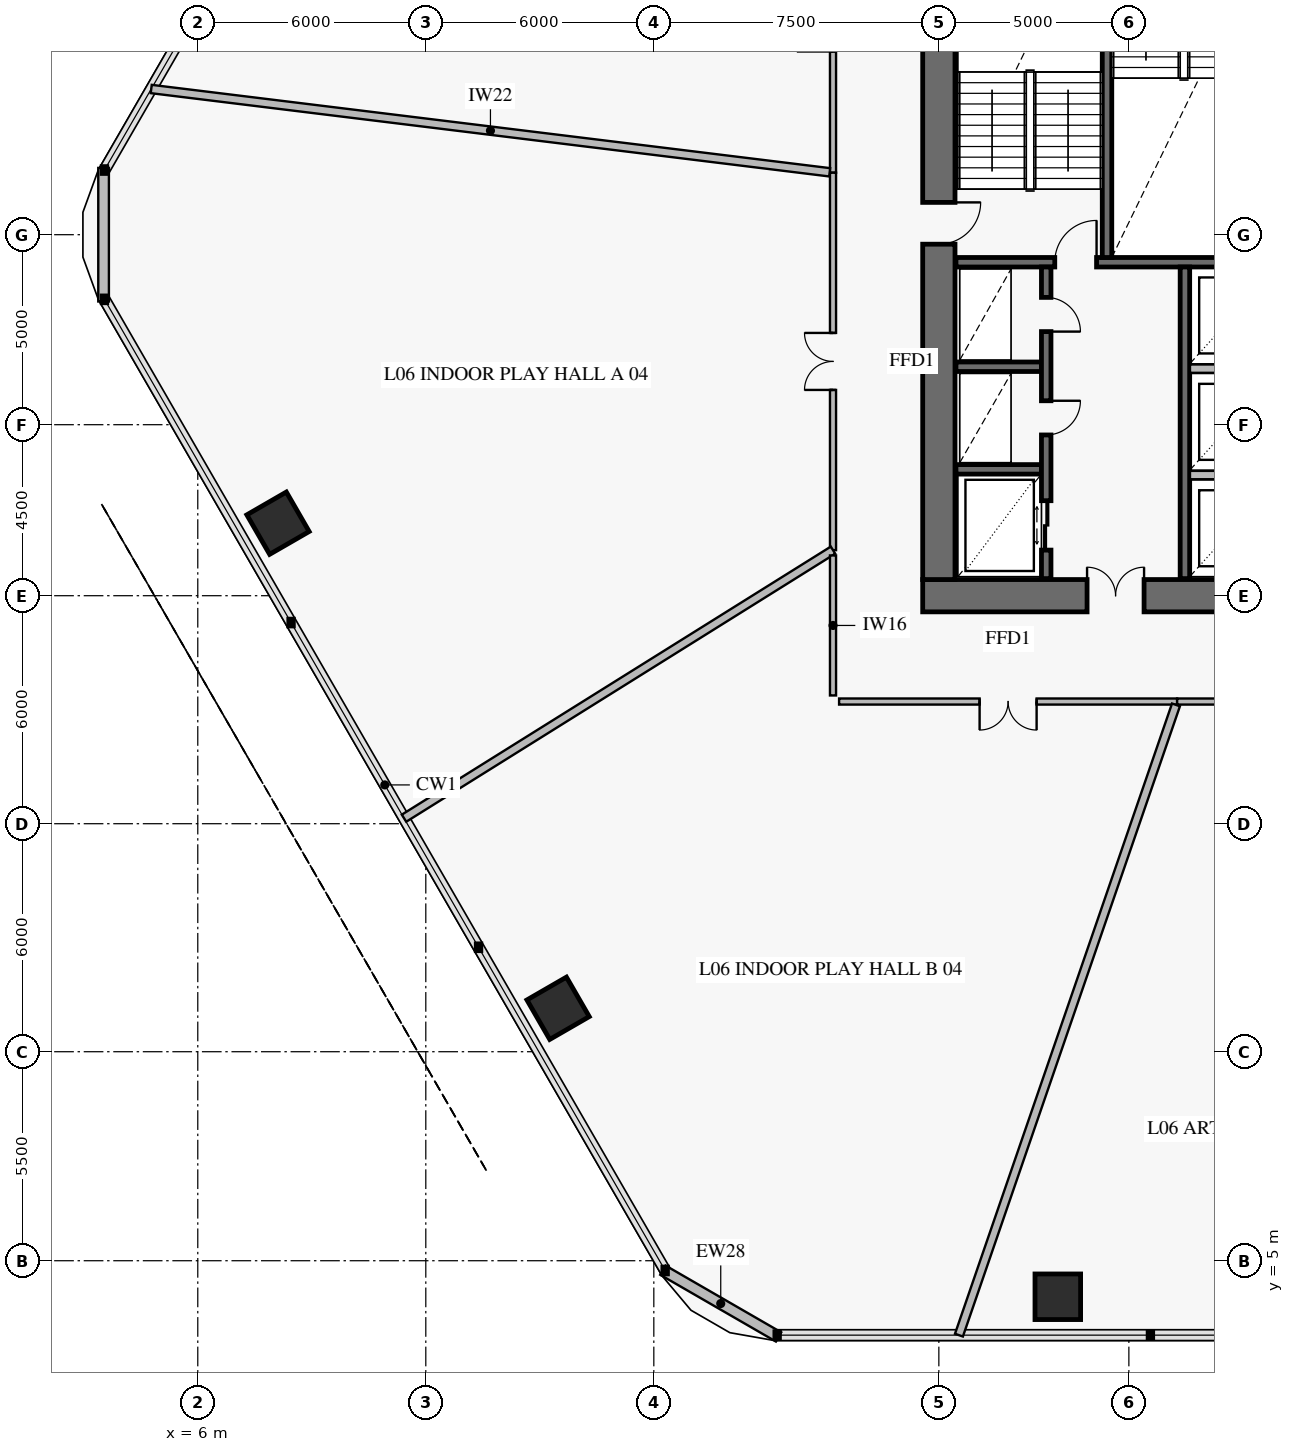
"""IFC4 building model, lengths in metres.
Left out: names, types, materials, properties, quantities, classifications, styles, units other than length and angle.
Written with IfcOpenShell. Run it as: python <this file> out.ifc"""

import sys

from ifc_helpers import new_model, si_unit, direction, frame, frame_2d, origin, origin_2d, place, context, subcontext, project, spatial, rectangle, extrude, element, fill, save


model = new_model("IFC4")
c1 = context("Model", 3, precision=1e-05, world=origin(), true_north=direction((0.0, 1.0)))
c2 = subcontext(c1, "Body", "Model", "MODEL_VIEW")
j1 = project(units=[si_unit("LENGTHUNIT", "METRE"), si_unit("PLANEANGLEUNIT", "RADIAN")], contexts=[c1])
p1 = place(None, origin())
s1 = spatial("IfcSite", under=j1, at=p1, CompositionType="ELEMENT")
p2 = place(p1, origin())
s2 = spatial("IfcBuilding", under=s1, at=p2, CompositionType="ELEMENT")
p3 = place(p2, frame((0.0, 0.0, 24.6)))
s3 = spatial("IfcBuildingStorey", under=s2, at=p3, CompositionType="ELEMENT", Elevation=24.6)
p4 = place(p3, frame((25.075, 22.5, 0.0), z_axis=(0.0, 0.0, 1.0), x_axis=(1.0, 0.0, 0.0)))
e1 = element("IfcWall", 1, at=p4, inside=s3, PredefinedType="SHEAR", context=c2, shape_type="SweptSolid", body=[
    extrude(rectangle(XDim=9.975, YDim=0.85, at=frame_2d((4.988, 0.0))), origin(), (0.0, 0.0, 1.0), 4.2),
])
p5 = place(p4, frame((4.325, 0.0, 0.0)))
e2 = element("IfcOpeningElement", 2, at=p5, cuts=e1, PredefinedType="OPENING", context=c2, shape_type="SweptSolid", body=[
    extrude(rectangle(XDim=1.5, YDim=2.15, at=frame_2d((0.75, 1.075))), frame((0.0, 0.437, 0.0), z_axis=(0.0, -1.0, 0.0), x_axis=(1.0, 0.0, 0.0)), (0.0, 0.0, 1.0), 0.874),
])
p6 = place(p3, frame((25.5, 22.925, 0.0), z_axis=(0.0, 0.0, 1.0), x_axis=(0.0, 1.0, 0.0)))
e3 = element("IfcWall", 3, at=p6, inside=s3, PredefinedType="SHEAR", context=c2, shape_type="SweptSolid", body=[
    extrude(rectangle(XDim=18.15, YDim=0.85, at=frame_2d((9.075, 0.0))), origin(), (0.0, 0.0, 1.0), 4.2),
])
p7 = place(p6, frame((8.825, 0.0, 0.0)))
e4 = element("IfcOpeningElement", 4, at=p7, cuts=e3, PredefinedType="OPENING", context=c2, shape_type="SweptSolid", body=[
    extrude(rectangle(XDim=1.1, YDim=2.15, at=frame_2d((0.55, 1.075))), frame((0.0, 0.437, 0.0), z_axis=(0.0, -1.0, 0.0), x_axis=(1.0, 0.0, 0.0)), (0.0, 0.0, 1.0), 0.874),
])
for number, where, z_axis, x_axis in (
    (5, (8.111, 24.408, 0.0), (0.0, 0.0, 1.0), (0.5, -0.866, 0.0)),
    (6, (15.481, 11.643, 0.0), (0.0, 0.0, 1.0), (0.5, -0.866, 0.0)),
    (7, (28.63, 4.052, 0.0), (0.0, 0.0, 1.0), (1.0, 0.0, 0.0)),
):
    element("IfcColumn", number, at=place(p3, frame(where, z_axis=z_axis, x_axis=x_axis)), inside=s3, PredefinedType="COLUMN", context=c2, shape_type="SweptSolid", body=[
        extrude(rectangle(XDim=1.2, YDim=1.2, at=origin_2d()), origin(), (0.0, 0.0, 1.0), 3.92),
    ])
p8 = place(p3, frame((21.283, 2.994, 0.0), z_axis=(0.0, 0.0, 1.0), x_axis=(-0.866007452331, 0.500031091541, 0.0)))
e8 = element("IfcWall", 8, at=p8, inside=s3, PredefinedType="SOLIDWALL", context=c2, shape_type="SweptSolid", body=[
    extrude(rectangle(XDim=3.515, YDim=0.28, at=frame_2d((1.757, 0.0))), origin(), (0.0, 0.0, 1.0), 3.92),
])
p9 = place(p3, frame((3.521, 30.242, 0.0), z_axis=(0.0, 0.0, 1.0), x_axis=(0.0, 1.0, 0.0)))
e9 = element("IfcWall", 9, at=p9, inside=s3, PredefinedType="SOLIDWALL", context=c2, shape_type="SweptSolid", body=[
    extrude(rectangle(XDim=3.515, YDim=0.28, at=frame_2d((1.758, 0.0))), origin(), (0.0, 0.0, 1.0), 3.92),
])
p10 = place(p3, frame((25.95, 31.275, 0.0), z_axis=(0.0, 0.0, 1.0), x_axis=(1.0, 0.0, 0.0)))
e10 = element("IfcWall", 10, at=p10, inside=s3, PredefinedType="SOLIDWALL", context=c2, shape_type="SweptSolid", body=[
    extrude(rectangle(XDim=20.1, YDim=0.25, at=frame_2d((10.05, 0.0))), origin(), (0.0, 0.0, 1.0), 4.2),
])
p11 = place(p10, frame((2.6, 0.0, 0.0)))
e11 = element("IfcOpeningElement", 11, at=p11, cuts=e10, PredefinedType="OPENING", context=c2, shape_type="SweptSolid", body=[
    extrude(rectangle(XDim=1.1, YDim=2.15, at=frame_2d((0.55, 1.075))), frame((0.0, 0.137, 0.0), z_axis=(0.0, -1.0, 0.0), x_axis=(1.0, 0.0, 0.0)), (0.0, 0.0, 1.0), 0.274),
])
p12 = place(p10, frame((10.6, 0.0, 0.0)))
e12 = element("IfcOpeningElement", 12, at=p12, cuts=e10, PredefinedType="OPENING", context=c2, shape_type="SweptSolid", body=[
    extrude(rectangle(XDim=1.1, YDim=2.15, at=frame_2d((0.55, 1.075))), frame((0.0, 0.137, 0.0), z_axis=(0.0, -1.0, 0.0), x_axis=(1.0, 0.0, 0.0)), (0.0, 0.0, 1.0), 0.274),
])
p13 = place(p10, frame((16.35, 0.0, 0.0)))
e13 = element("IfcOpeningElement", 13, at=p13, cuts=e10, PredefinedType="OPENING", context=c2, shape_type="SweptSolid", body=[
    extrude(rectangle(XDim=1.1, YDim=2.15, at=frame_2d((0.55, 1.075))), frame((0.0, 0.137, 0.0), z_axis=(0.0, -1.0, 0.0), x_axis=(1.0, 0.0, 0.0)), (0.0, 0.0, 1.0), 0.274),
])
p14 = place(p3, frame((29.925, 31.4, 0.0), z_axis=(0.0, 0.0, 1.0), x_axis=(0.0, 1.0, 0.0)))
e14 = element("IfcWall", 14, at=p14, inside=s3, PredefinedType="SOLIDWALL", context=c2, shape_type="SweptSolid", body=[
    extrude(rectangle(XDim=9.7, YDim=0.25, at=frame_2d((4.85, 0.0))), origin(), (0.0, 0.0, 1.0), 4.2),
])
for number, where, z_axis, x_axis in (
    (15, (25.95, 25.825, 0.0), (0.0, 0.0, 1.0), (1.0, 0.0, 0.0)),
    (16, (25.95, 28.525, 0.0), (0.0, 0.0, 1.0), (1.0, 0.0, 0.0)),
):
    element("IfcWall", number, at=place(p3, frame(where, z_axis=z_axis, x_axis=x_axis)), inside=s3, PredefinedType="SOLIDWALL", context=c2, shape_type="SweptSolid", body=[
        extrude(rectangle(XDim=2.25, YDim=0.25, at=frame_2d((1.125, 0.0))), origin(), (0.0, 0.0, 1.0), 4.2),
    ])
p15 = place(p3, frame((28.325, 22.95, 0.0), z_axis=(0.0, 0.0, 1.0), x_axis=(0.0, 1.0, 0.0)))
e17 = element("IfcWall", 17, at=p15, inside=s3, PredefinedType="SOLIDWALL", context=c2, shape_type="SweptSolid", body=[
    extrude(rectangle(XDim=8.2, YDim=0.25, at=frame_2d((4.1, 0.0))), origin(), (0.0, 0.0, 1.0), 4.2),
])
p16 = place(p15, frame((0.75, 0.0, 0.0)))
e18 = element("IfcOpeningElement", 18, at=p16, cuts=e17, PredefinedType="OPENING", context=c2, shape_type="SweptSolid", body=[
    extrude(rectangle(XDim=1.3, YDim=2.3, at=frame_2d((0.65, 1.15))), frame((0.0, 0.137, 0.0), z_axis=(0.0, -1.0, 0.0), x_axis=(1.0, 0.0, 0.0)), (0.0, 0.0, 1.0), 0.274),
])
p17 = place(p15, frame((3.78, 0.0, 0.0)))
e19 = element("IfcOpeningElement", 19, at=p17, cuts=e17, PredefinedType="OPENING", context=c2, shape_type="SweptSolid", body=[
    extrude(rectangle(XDim=0.9, YDim=2.1, at=frame_2d((0.45, 1.05))), frame((0.0, 0.137, 0.0), z_axis=(0.0, -1.0, 0.0), x_axis=(1.0, 0.0, 0.0)), (0.0, 0.0, 1.0), 0.274),
])
p18 = place(p15, frame((6.5, 0.0, 0.0)))
e20 = element("IfcOpeningElement", 20, at=p18, cuts=e17, PredefinedType="OPENING", context=c2, shape_type="SweptSolid", body=[
    extrude(rectangle(XDim=0.9, YDim=2.1, at=frame_2d((0.45, 1.05))), frame((0.0, 0.137, 0.0), z_axis=(0.0, -1.0, 0.0), x_axis=(1.0, 0.0, 0.0)), (0.0, 0.0, 1.0), 0.274),
])
p19 = place(p3, frame((31.975, 22.95, 0.0), z_axis=(0.0, 0.0, 1.0), x_axis=(0.0, 1.0, 0.0)))
e21 = element("IfcWall", 21, at=p19, inside=s3, PredefinedType="SOLIDWALL", context=c2, shape_type="SweptSolid", body=[
    extrude(rectangle(XDim=8.2, YDim=0.25, at=frame_2d((4.1, 0.0))), origin(), (0.0, 0.0, 1.0), 4.2),
])
p20 = place(p3, frame((22.715, 40.961, 0.0), z_axis=(0.0, 0.0, 1.0), x_axis=(0.0, -1.0, 0.0)))
e22 = element("IfcWall", 22, at=p20, inside=s3, PredefinedType="PARTITIONING", context=c2, shape_type="SweptSolid", body=[
    extrude(rectangle(XDim=7.33, YDim=0.16, at=frame_2d((3.665, 0.0))), origin(), (0.0, 0.0, 1.0), 3.22),
])
p21 = place(p20, frame((3.19, 0.0, 0.0)))
e23 = element("IfcOpeningElement", 23, at=p21, cuts=e22, PredefinedType="OPENING", context=c2, shape_type="SweptSolid", body=[
    extrude(rectangle(XDim=0.95, YDim=2.1, at=frame_2d((0.475, 1.05))), frame((0.0, 0.092, 0.0), z_axis=(0.0, -1.0, 0.0), x_axis=(1.0, 0.0, 0.0)), (0.0, 0.0, 1.0), 0.184),
])
p22 = place(p3, frame((22.715, 33.631, 0.0), z_axis=(0.0, 0.0, 1.0), x_axis=(0.0, -1.0, 0.0)))
e24 = element("IfcWall", 24, at=p22, inside=s3, PredefinedType="PARTITIONING", context=c2, shape_type="SweptSolid", body=[
    extrude(rectangle(XDim=9.933, YDim=0.16, at=frame_2d((4.966, 0.0))), origin(), (0.0, 0.0, 1.0), 3.22),
])
p23 = place(p22, frame((4.216, 0.0, 0.0)))
e25 = element("IfcOpeningElement", 25, at=p23, cuts=e24, PredefinedType="OPENING", context=c2, shape_type="SweptSolid", body=[
    extrude(rectangle(XDim=1.5, YDim=2.15, at=frame_2d((0.75, 1.075))), frame((0.0, 0.092, 0.0), z_axis=(0.0, -1.0, 0.0), x_axis=(1.0, 0.0, 0.0)), (0.0, 0.0, 1.0), 0.184),
])
p24 = place(p3, frame((22.875, 19.715, 0.0), z_axis=(0.0, 0.0, 1.0), x_axis=(1.0, 0.0, 0.0)))
e26 = element("IfcWall", 26, at=p24, inside=s3, PredefinedType="PARTITIONING", context=c2, shape_type="SweptSolid", body=[
    extrude(rectangle(XDim=8.895, YDim=0.16, at=frame_2d((4.448, 0.0))), origin(), (0.0, 0.0, 1.0), 3.22),
])
p25 = place(p24, frame((3.698, 0.0, 0.0)))
e27 = element("IfcOpeningElement", 27, at=p25, cuts=e26, PredefinedType="OPENING", context=c2, shape_type="SweptSolid", body=[
    extrude(rectangle(XDim=1.5, YDim=2.15, at=frame_2d((0.75, 1.075))), frame((0.0, 0.092, 0.0), z_axis=(0.0, -1.0, 0.0), x_axis=(1.0, 0.0, 0.0)), (0.0, 0.0, 1.0), 0.184),
])
p26 = place(p3, frame((31.77, 19.715, 0.0), z_axis=(0.0, 0.0, 1.0), x_axis=(1.0, 0.0, 0.0)))
e28 = element("IfcWall", 28, at=p26, inside=s3, PredefinedType="PARTITIONING", context=c2, shape_type="SweptSolid", body=[
    extrude(rectangle(XDim=5.738, YDim=0.16, at=frame_2d((2.869, 0.0))), origin(), (0.0, 0.0, 1.0), 3.22),
])
p27 = place(p26, frame((2.294, 0.0, 0.0)))
e29 = element("IfcOpeningElement", 29, at=p27, cuts=e28, PredefinedType="OPENING", context=c2, shape_type="SweptSolid", body=[
    extrude(rectangle(XDim=1.15, YDim=2.2, at=frame_2d((0.575, 1.1))), frame((0.0, 0.092, 0.0), z_axis=(0.0, -1.0, 0.0), x_axis=(1.0, 0.0, 0.0)), (0.0, 0.0, 1.0), 0.184),
])
for number, where, z_axis, x_axis in (
    (30, (32.108, 25.675, 0.0), (0.0, 0.0, 1.0), (1.0, 0.0, 0.0)),
    (31, (32.108, 28.475, 0.0), (0.0, 0.0, 1.0), (1.0, 0.0, 0.0)),
):
    element("IfcWall", number, at=place(p3, frame(where, z_axis=z_axis, x_axis=x_axis)), inside=s3, PredefinedType="PARTITIONING", context=c2, shape_type="SweptSolid", body=[
        extrude(rectangle(XDim=2.284, YDim=0.22, at=frame_2d((1.142, 0.0))), origin(), (0.0, 0.0, 1.0), 3.92),
    ])
p28 = place(p3, frame((22.627, 33.642, 0.0), z_axis=(0.0, 0.0, 1.0), x_axis=(-0.99254636489, 0.121867606624, 0.0)))
e32 = element("IfcWall", 32, at=p28, inside=s3, PredefinedType="PARTITIONING", context=c2, shape_type="SweptSolid", body=[
    extrude(rectangle(XDim=17.986, YDim=0.22, at=frame_2d((8.993, 0.0))), origin(), (0.0, 0.0, 1.0), 3.17),
])
p29 = place(p3, frame((22.715, 23.698, 0.0), z_axis=(0.0, 0.0, 1.0), x_axis=(-0.848051882484, -0.529913204794, 0.0)))
e33 = element("IfcWall", 33, at=p29, inside=s3, PredefinedType="PARTITIONING", context=c2, shape_type="SweptSolid", body=[
    extrude(rectangle(XDim=13.311, YDim=0.22, at=frame_2d((6.655, 0.0))), origin(), (0.0, 0.0, 1.0), 3.17),
])
p30 = place(p3, frame((22.715, 23.56, 0.0), z_axis=(0.0, 0.0, 1.0), x_axis=(0.0, -1.0, 0.0)))
e34 = element("IfcWall", 34, at=p30, inside=s3, PredefinedType="PARTITIONING", context=c2, shape_type="SweptSolid", body=[
    extrude(rectangle(XDim=3.685, YDim=0.16, at=frame_2d((1.842, 0.0))), origin(), (0.0, 0.0, 1.0), 3.92),
])
p31 = place(p3, frame((31.74, 19.627, 0.0), z_axis=(0.0, 0.0, 1.0), x_axis=(-0.325561284918, -0.945520940943, 0.0)))
e35 = element("IfcWall", 35, at=p31, inside=s3, PredefinedType="PARTITIONING", context=c2, shape_type="SweptSolid", body=[
    extrude(rectangle(XDim=17.541, YDim=0.22, at=frame_2d((8.771, 0.0))), origin(), (0.0, 0.0, 1.0), 3.17),
])
p32 = place(p7, frame((1.1, 0.0, 0.0), z_axis=(0.0, 0.0, 1.0), x_axis=(-1.0, 0.0, 0.0)))
e36 = element("IfcDoor", 36, at=p32, inside=s3, OperationType="SINGLE_SWING_LEFT", PredefinedType="USERDEFINED", context=c2, shape_type="SweptSolid", body=[
    extrude(rectangle(XDim=1.1, YDim=2.15, at=frame_2d((0.55, 1.075))), frame((0.0, 0.025, 0.0), z_axis=(0.0, -1.0, 0.0), x_axis=(1.0, 0.0, 0.0)), (0.0, 0.0, 1.0), 0.05),
])
fill(e4, e36)
p33 = place(p5, origin())
e37 = element("IfcDoor", 37, at=p33, inside=s3, OperationType="DOUBLE_DOOR_SINGLE_SWING", PredefinedType="DOOR", context=c2, shape_type="SweptSolid", body=[
    extrude(rectangle(XDim=1.5, YDim=2.15, at=frame_2d((0.75, 1.075))), frame((0.0, 0.025, 0.0), z_axis=(0.0, -1.0, 0.0), x_axis=(1.0, 0.0, 0.0)), (0.0, 0.0, 1.0), 0.05),
])
fill(e2, e37)
p34 = place(p11, origin())
e38 = element("IfcDoor", 38, at=p34, inside=s3, OperationType="SINGLE_SWING_RIGHT", PredefinedType="USERDEFINED", context=c2, shape_type="SweptSolid", body=[
    extrude(rectangle(XDim=1.1, YDim=2.15, at=frame_2d((0.55, 1.075))), frame((0.0, 0.025, 0.0), z_axis=(0.0, -1.0, 0.0), x_axis=(1.0, 0.0, 0.0)), (0.0, 0.0, 1.0), 0.05),
])
fill(e11, e38)
p35 = place(p16, frame((1.3, 0.0, 0.0), z_axis=(0.0, 0.0, 1.0), x_axis=(-1.0, 0.0, 0.0)))
e39 = element("IfcDoor", 39, at=p35, inside=s3, OperationType="DOUBLE_DOOR_SLIDING", PredefinedType="DOOR", context=c2, shape_type="SweptSolid", body=[
    extrude(rectangle(XDim=1.3, YDim=2.3, at=frame_2d((0.65, 1.15))), frame((0.0, 0.025, 0.0), z_axis=(0.0, -1.0, 0.0), x_axis=(1.0, 0.0, 0.0)), (0.0, 0.0, 1.0), 0.05),
])
fill(e18, e39)
p36 = place(p17, frame((0.9, 0.0, 0.0), z_axis=(0.0, 0.0, 1.0), x_axis=(-1.0, 0.0, 0.0)))
e40 = element("IfcDoor", 40, at=p36, inside=s3, OperationType="SINGLE_SWING_LEFT", PredefinedType="DOOR", context=c2, shape_type="SweptSolid", body=[
    extrude(rectangle(XDim=0.9, YDim=2.1, at=frame_2d((0.45, 1.05))), frame((0.0, 0.025, 0.0), z_axis=(0.0, -1.0, 0.0), x_axis=(1.0, 0.0, 0.0)), (0.0, 0.0, 1.0), 0.05),
])
fill(e19, e40)
p37 = place(p18, frame((0.9, 0.0, 0.0), z_axis=(0.0, 0.0, 1.0), x_axis=(-1.0, 0.0, 0.0)))
e41 = element("IfcDoor", 41, at=p37, inside=s3, OperationType="SINGLE_SWING_RIGHT", PredefinedType="DOOR", context=c2, shape_type="SweptSolid", body=[
    extrude(rectangle(XDim=0.9, YDim=2.1, at=frame_2d((0.45, 1.05))), frame((0.0, 0.025, 0.0), z_axis=(0.0, -1.0, 0.0), x_axis=(1.0, 0.0, 0.0)), (0.0, 0.0, 1.0), 0.05),
])
fill(e20, e41)
p38 = place(p23, frame((1.5, 0.0, 0.0), z_axis=(0.0, 0.0, 1.0), x_axis=(-1.0, 0.0, 0.0)))
e42 = element("IfcDoor", 42, at=p38, inside=s3, OperationType="DOUBLE_DOOR_SINGLE_SWING", PredefinedType="DOOR", context=c2, shape_type="SweptSolid", body=[
    extrude(rectangle(XDim=1.5, YDim=2.15, at=frame_2d((0.75, 1.075))), frame((0.0, 0.025, 0.0), z_axis=(0.0, -1.0, 0.0), x_axis=(1.0, 0.0, 0.0)), (0.0, 0.0, 1.0), 0.05),
])
fill(e25, e42)
p39 = place(p25, frame((1.5, 0.0, 0.0), z_axis=(0.0, 0.0, 1.0), x_axis=(-1.0, 0.0, 0.0)))
e43 = element("IfcDoor", 43, at=p39, inside=s3, OperationType="DOUBLE_DOOR_SINGLE_SWING", PredefinedType="DOOR", context=c2, shape_type="SweptSolid", body=[
    extrude(rectangle(XDim=1.5, YDim=2.15, at=frame_2d((0.75, 1.075))), frame((0.0, 0.025, 0.0), z_axis=(0.0, -1.0, 0.0), x_axis=(1.0, 0.0, 0.0)), (0.0, 0.0, 1.0), 0.05),
])
fill(e27, e43)
save(model, sys.argv[1])
